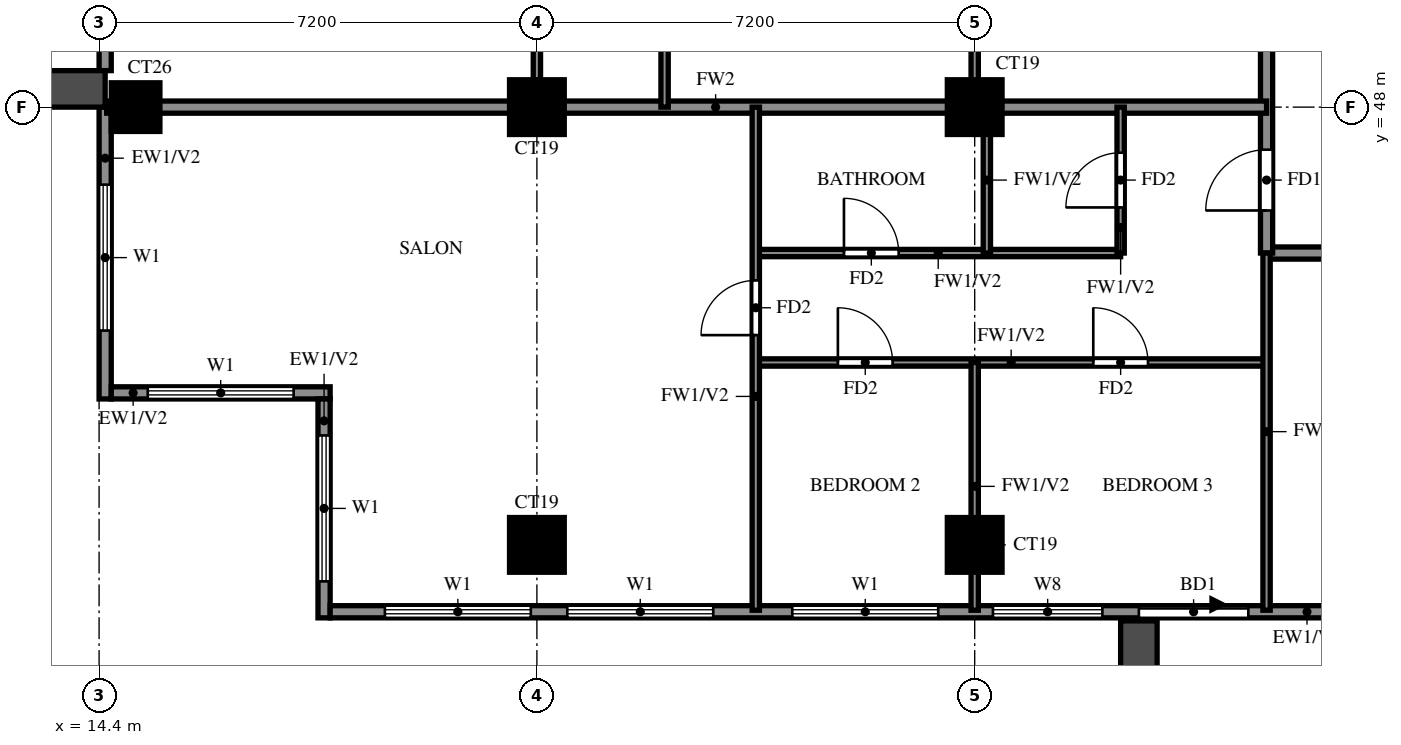
"""IFC4 building model, lengths in metres.
Left out: names, types, materials, properties, quantities, classifications, styles, units other than length and angle.
Written with IfcOpenShell. Run it as: python <this file> out.ifc"""

import sys

from ifc_helpers import new_model, si_unit, direction, frame, frame_2d, origin, origin_2d, place, context, subcontext, project, spatial, rectangle, extrude, source, transform, mapped, element, fill, save


model = new_model("IFC4")
c1 = context("Model", 3, precision=1e-05, world=origin(), true_north=direction((0.0, 1.0)))
c2 = subcontext(c1, "Body", "Model", "MODEL_VIEW")
j1 = project(units=[si_unit("LENGTHUNIT", "METRE"), si_unit("PLANEANGLEUNIT", "RADIAN")], contexts=[c1])
p1 = place(None, origin())
s1 = spatial("IfcSite", under=j1, at=p1, CompositionType="ELEMENT")
p2 = place(p1, origin())
s2 = spatial("IfcBuilding", under=s1, at=p2, CompositionType="ELEMENT")
p3 = place(p2, frame((0.0, 0.0, 174.5)))
s3 = spatial("IfcBuildingStorey", under=s2, at=p3, CompositionType="ELEMENT", Elevation=174.5)
m1 = source(origin(), c2, "Body", "SweptSolid", [
    extrude(rectangle(XDim=0.9, YDim=0.9, at=origin_2d()), origin(), (0.0, 0.0, 1.0), 3.2),
])
for number, where, z_axis, x_axis in (
    (1, (21.6, 40.8, 0.0), (0.0, 0.0, 1.0), (1.0, 0.0, 0.0)),
    (2, (28.8, 40.8, 0.0), (0.0, 0.0, 1.0), (1.0, 0.0, 0.0)),
):
    element("IfcColumn", number, at=place(p3, frame(where, z_axis=z_axis, x_axis=x_axis)), inside=s3, PredefinedType="COLUMN", context=c2, shape_type="MappedRepresentation", body=[
        mapped(m1, transform((0.0, 0.0, 0.0))),
    ])
m2 = source(origin(), c2, "Body", "SweptSolid", [
    extrude(rectangle(XDim=0.8, YDim=0.8, at=origin_2d()), origin(), (0.0, 0.0, 1.0), 3.2),
])
p4 = place(p3, frame((15.0, 48.0, 0.0), z_axis=(0.0, 0.0, 1.0), x_axis=(1.0, 0.0, 0.0)))
e3 = element("IfcColumn", 3, at=p4, inside=s3, PredefinedType="COLUMN", context=c2, shape_type="MappedRepresentation", body=[
    mapped(m2, transform((0.0, 0.0, 0.0))),
])
for number, where, z_axis, x_axis in (
    (4, (21.6, 48.0, 0.0), (0.0, 0.0, 1.0), (1.0, 0.0, 0.0)),
    (5, (28.8, 48.0, 0.0), (0.0, 0.0, 1.0), (1.0, 0.0, 0.0)),
):
    element("IfcColumn", number, at=place(p3, frame(where, z_axis=z_axis, x_axis=x_axis)), inside=s3, PredefinedType="COLUMN", context=c2, shape_type="MappedRepresentation", body=[
        mapped(m1, transform((0.0, 0.0, 0.0))),
    ])
p5 = place(p3, frame((14.5, 54.6, 0.0), z_axis=(0.0, 0.0, 1.0), x_axis=(0.0, -1.0, 0.0)))
e6 = element("IfcWall", 6, at=p5, inside=s3, PredefinedType="SOLIDWALL", context=c2, shape_type="SweptSolid", body=[
    extrude(rectangle(XDim=6.0, YDim=0.2, at=frame_2d((3.0, 0.0))), origin(), (0.0, 0.0, 1.0), 3.2),
])
p6 = place(p5, frame((0.9, 0.0, 0.0)))
e7 = element("IfcOpeningElement", 7, at=p6, cuts=e6, PredefinedType="OPENING", context=c2, shape_type="SweptSolid", body=[
    extrude(rectangle(XDim=1.8, YDim=2.4, at=frame_2d((0.9, 1.2))), frame((0.0, 0.11, 0.0), z_axis=(0.0, -1.0, 0.0), x_axis=(1.0, 0.0, 0.0)), (0.0, 0.0, 1.0), 0.22),
])
p7 = place(p5, frame((3.5, 0.0, 0.6)))
e8 = element("IfcOpeningElement", 8, at=p7, cuts=e6, PredefinedType="OPENING", context=c2, shape_type="SweptSolid", body=[
    extrude(rectangle(XDim=1.8, YDim=2.4, at=frame_2d((0.9, 1.2))), frame((0.0, 0.11, 0.0), z_axis=(0.0, -1.0, 0.0), x_axis=(1.0, 0.0, 0.0)), (0.0, 0.0, 1.0), 0.22),
])
p8 = place(p3, frame((14.5, 48.0, 0.0), z_axis=(0.0, 0.0, 1.0), x_axis=(0.0, -1.0, 0.0)))
e9 = element("IfcWall", 9, at=p8, inside=s3, PredefinedType="SOLIDWALL", context=c2, shape_type="SweptSolid", body=[
    extrude(rectangle(XDim=4.8, YDim=0.2, at=frame_2d((2.4, 0.0))), origin(), (0.0, 0.0, 1.0), 3.2),
])
p9 = place(p8, frame((1.275, 0.0, 0.6)))
e10 = element("IfcOpeningElement", 10, at=p9, cuts=e9, PredefinedType="OPENING", context=c2, shape_type="SweptSolid", body=[
    extrude(rectangle(XDim=2.4, YDim=2.4, at=frame_2d((1.2, 1.2))), frame((0.0, 0.11, 0.0), z_axis=(0.0, -1.0, 0.0), x_axis=(1.0, 0.0, 0.0)), (0.0, 0.0, 1.0), 0.22),
])
p10 = place(p3, frame((14.6, 43.3, 0.0), z_axis=(0.0, 0.0, 1.0), x_axis=(1.0, 0.0, 0.0)))
e11 = element("IfcWall", 11, at=p10, inside=s3, PredefinedType="SOLIDWALL", context=c2, shape_type="SweptSolid", body=[
    extrude(rectangle(XDim=3.6, YDim=0.2, at=frame_2d((1.8, 0.0))), origin(), (0.0, 0.0, 1.0), 3.2),
])
p11 = place(p10, frame((0.6, 0.0, 0.6)))
e12 = element("IfcOpeningElement", 12, at=p11, cuts=e11, PredefinedType="OPENING", context=c2, shape_type="SweptSolid", body=[
    extrude(rectangle(XDim=2.4, YDim=2.4, at=frame_2d((1.2, 1.2))), frame((0.0, 0.11, 0.0), z_axis=(0.0, -1.0, 0.0), x_axis=(1.0, 0.0, 0.0)), (0.0, 0.0, 1.0), 0.22),
])
p12 = place(p3, frame((18.1, 43.2, 0.0), z_axis=(0.0, 0.0, 1.0), x_axis=(0.0, -1.0, 0.0)))
e13 = element("IfcWall", 13, at=p12, inside=s3, PredefinedType="SOLIDWALL", context=c2, shape_type="SweptSolid", body=[
    extrude(rectangle(XDim=3.6, YDim=0.2, at=frame_2d((1.8, 0.0))), origin(), (0.0, 0.0, 1.0), 3.2),
])
p13 = place(p12, frame((0.6, 0.0, 0.6)))
e14 = element("IfcOpeningElement", 14, at=p13, cuts=e13, PredefinedType="OPENING", context=c2, shape_type="SweptSolid", body=[
    extrude(rectangle(XDim=2.4, YDim=2.4, at=frame_2d((1.2, 1.2))), frame((0.0, 0.11, 0.0), z_axis=(0.0, -1.0, 0.0), x_axis=(1.0, 0.0, 0.0)), (0.0, 0.0, 1.0), 0.22),
])
p14 = place(p3, frame((18.2, 39.7, 0.0), z_axis=(0.0, 0.0, 1.0), x_axis=(1.0, 0.0, 0.0)))
e15 = element("IfcWall", 15, at=p14, inside=s3, PredefinedType="SOLIDWALL", context=c2, shape_type="SweptSolid", body=[
    extrude(rectangle(XDim=23.8, YDim=0.2, at=frame_2d((11.9, 0.0))), origin(), (0.0, 0.0, 1.0), 3.2),
])
p15 = place(p14, frame((13.3, 0.0, 0.0)))
e16 = element("IfcOpeningElement", 16, at=p15, cuts=e15, PredefinedType="OPENING", context=c2, shape_type="SweptSolid", body=[
    extrude(rectangle(XDim=1.8, YDim=2.4, at=frame_2d((0.9, 1.2))), frame((0.0, 0.11, 0.0), z_axis=(0.0, -1.0, 0.0), x_axis=(1.0, 0.0, 0.0)), (0.0, 0.0, 1.0), 0.22),
])
p16 = place(p14, frame((0.9, 0.0, 0.6)))
e17 = element("IfcOpeningElement", 17, at=p16, cuts=e15, PredefinedType="OPENING", context=c2, shape_type="SweptSolid", body=[
    extrude(rectangle(XDim=2.4, YDim=2.4, at=frame_2d((1.2, 1.2))), frame((0.0, 0.11, 0.0), z_axis=(0.0, -1.0, 0.0), x_axis=(1.0, 0.0, 0.0)), (0.0, 0.0, 1.0), 0.22),
])
p17 = place(p14, frame((3.9, 0.0, 0.6)))
e18 = element("IfcOpeningElement", 18, at=p17, cuts=e15, PredefinedType="OPENING", context=c2, shape_type="SweptSolid", body=[
    extrude(rectangle(XDim=2.4, YDim=2.4, at=frame_2d((1.2, 1.2))), frame((0.0, 0.11, 0.0), z_axis=(0.0, -1.0, 0.0), x_axis=(1.0, 0.0, 0.0)), (0.0, 0.0, 1.0), 0.22),
])
p18 = place(p14, frame((7.6, 0.0, 0.6)))
e19 = element("IfcOpeningElement", 19, at=p18, cuts=e15, PredefinedType="OPENING", context=c2, shape_type="SweptSolid", body=[
    extrude(rectangle(XDim=2.4, YDim=2.4, at=frame_2d((1.2, 1.2))), frame((0.0, 0.11, 0.0), z_axis=(0.0, -1.0, 0.0), x_axis=(1.0, 0.0, 0.0)), (0.0, 0.0, 1.0), 0.22),
])
p19 = place(p14, frame((10.9, 0.0, 0.6)))
e20 = element("IfcOpeningElement", 20, at=p19, cuts=e15, PredefinedType="OPENING", context=c2, shape_type="SweptSolid", body=[
    extrude(rectangle(XDim=1.8, YDim=2.4, at=frame_2d((0.9, 1.2))), frame((0.0, 0.11, 0.0), z_axis=(0.0, -1.0, 0.0), x_axis=(1.0, 0.0, 0.0)), (0.0, 0.0, 1.0), 0.22),
])
p20 = place(p3, frame((14.5, 48.3, 0.0), z_axis=(0.0, 0.0, 1.0), x_axis=(-1.0, 0.0, 0.0)))
e21 = element("IfcWall", 21, at=p20, inside=s3, PredefinedType="SOLIDWALL", context=c2, shape_type="SweptSolid", body=[
    extrude(rectangle(XDim=2.8, YDim=0.6, at=frame_2d((1.4, 0.0))), origin(), (0.0, 0.0, 1.0), 2.85),
])
p21 = place(p3, frame((31.5, 39.55, 0.0), z_axis=(0.0, 0.0, 1.0), x_axis=(0.0, -1.0, 0.0)))
e22 = element("IfcWall", 22, at=p21, inside=s3, PredefinedType="SOLIDWALL", context=c2, shape_type="SweptSolid", body=[
    extrude(rectangle(XDim=2.65, YDim=0.6, at=frame_2d((1.325, 0.0))), origin(), (0.0, 0.0, 1.0), 2.85),
])
p22 = place(p3, frame((33.6, 45.6, 0.0), z_axis=(0.0, 0.0, 1.0), x_axis=(1.0, 0.0, 0.0)))
e23 = element("IfcWall", 23, at=p22, inside=s3, PredefinedType="SOLIDWALL", context=c2, shape_type="SweptSolid", body=[
    extrude(rectangle(XDim=7.2, YDim=0.2, at=frame_2d((3.6, 0.0))), origin(), (0.0, 0.0, 1.0), 3.2),
])
p23 = place(p22, frame((3.15, 0.0, 0.0)))
e24 = element("IfcOpeningElement", 24, at=p23, cuts=e23, PredefinedType="OPENING", context=c2, shape_type="SweptSolid", body=[
    extrude(rectangle(XDim=0.9, YDim=2.1, at=frame_2d((0.45, 1.05))), frame((0.0, 0.11, 0.0), z_axis=(0.0, -1.0, 0.0), x_axis=(1.0, 0.0, 0.0)), (0.0, 0.0, 1.0), 0.22),
])
p24 = place(p3, frame((33.6, 45.6, 0.0), z_axis=(0.0, 0.0, 1.0), x_axis=(0.0, 1.0, 0.0)))
e25 = element("IfcWall", 25, at=p24, inside=s3, PredefinedType="SOLIDWALL", context=c2, shape_type="SweptSolid", body=[
    extrude(rectangle(XDim=8.4, YDim=0.2, at=frame_2d((4.2, 0.0))), origin(), (0.0, 0.0, 1.0), 3.2),
])
p25 = place(p24, frame((0.7, 0.0, 0.0)))
e26 = element("IfcOpeningElement", 26, at=p25, cuts=e25, PredefinedType="OPENING", context=c2, shape_type="SweptSolid", body=[
    extrude(rectangle(XDim=1.0, YDim=2.1, at=frame_2d((0.5, 1.05))), frame((0.0, 0.11, 0.0), z_axis=(0.0, -1.0, 0.0), x_axis=(1.0, 0.0, 0.0)), (0.0, 0.0, 1.0), 0.22),
])
p26 = place(p24, frame((6.7, 0.0, 0.0)))
e27 = element("IfcOpeningElement", 27, at=p26, cuts=e25, PredefinedType="OPENING", context=c2, shape_type="SweptSolid", body=[
    extrude(rectangle(XDim=1.0, YDim=2.1, at=frame_2d((0.5, 1.05))), frame((0.0, 0.11, 0.0), z_axis=(0.0, -1.0, 0.0), x_axis=(1.0, 0.0, 0.0)), (0.0, 0.0, 1.0), 0.22),
])
p27 = place(p3, frame((14.525, 48.0, 0.0), z_axis=(0.0, 0.0, 1.0), x_axis=(1.0, 0.0, 0.0)))
e28 = element("IfcWall", 28, at=p27, inside=s3, PredefinedType="SOLIDWALL", context=c2, shape_type="SweptSolid", body=[
    extrude(rectangle(XDim=19.075, YDim=0.2, at=frame_2d((9.538, 0.0))), origin(), (0.0, 0.0, 1.0), 3.2),
])
p28 = place(p3, frame((25.2, 43.8, 0.0), z_axis=(0.0, 0.0, 1.0), x_axis=(1.0, 0.0, 0.0)))
e29 = element("IfcWall", 29, at=p28, inside=s3, PredefinedType="PARTITIONING", context=c2, shape_type="SweptSolid", body=[
    extrude(rectangle(XDim=8.4, YDim=0.12, at=frame_2d((4.2, 0.0))), origin(), (0.0, 0.0, 1.0), 3.2),
])
p29 = place(p28, frame((1.35, 0.0, 0.0)))
e30 = element("IfcOpeningElement", 30, at=p29, cuts=e29, PredefinedType="OPENING", context=c2, shape_type="SweptSolid", body=[
    extrude(rectangle(XDim=0.9, YDim=2.1, at=frame_2d((0.45, 1.05))), frame((0.0, 0.07, 0.0), z_axis=(0.0, -1.0, 0.0), x_axis=(1.0, 0.0, 0.0)), (0.0, 0.0, 1.0), 0.14),
])
p30 = place(p28, frame((5.55, 0.0, 0.0)))
e31 = element("IfcOpeningElement", 31, at=p30, cuts=e29, PredefinedType="OPENING", context=c2, shape_type="SweptSolid", body=[
    extrude(rectangle(XDim=0.9, YDim=2.1, at=frame_2d((0.45, 1.05))), frame((0.0, 0.07, 0.0), z_axis=(0.0, -1.0, 0.0), x_axis=(1.0, 0.0, 0.0)), (0.0, 0.0, 1.0), 0.14),
])
p31 = place(p3, frame((25.2, 45.6, 0.0), z_axis=(0.0, 0.0, 1.0), x_axis=(1.0, 0.0, 0.0)))
e32 = element("IfcWall", 32, at=p31, inside=s3, PredefinedType="PARTITIONING", context=c2, shape_type="SweptSolid", body=[
    extrude(rectangle(XDim=6.0, YDim=0.12, at=frame_2d((3.0, 0.0))), origin(), (0.0, 0.0, 1.0), 3.2),
])
p32 = place(p31, frame((1.45, 0.0, 0.0)))
e33 = element("IfcOpeningElement", 33, at=p32, cuts=e32, PredefinedType="OPENING", context=c2, shape_type="SweptSolid", body=[
    extrude(rectangle(XDim=0.9, YDim=2.1, at=frame_2d((0.45, 1.05))), frame((0.0, 0.07, 0.0), z_axis=(0.0, -1.0, 0.0), x_axis=(1.0, 0.0, 0.0)), (0.0, 0.0, 1.0), 0.14),
])
p33 = place(p3, frame((21.6, 48.0, 0.0), z_axis=(0.0, 0.0, 1.0), x_axis=(0.0, 1.0, 0.0)))
e34 = element("IfcWall", 34, at=p33, inside=s3, PredefinedType="PARTITIONING", context=c2, shape_type="SweptSolid", body=[
    extrude(rectangle(XDim=21.6, YDim=0.12, at=frame_2d((10.8, 0.0))), origin(), (0.0, 0.0, 1.0), 3.2),
])
p34 = place(p33, frame((1.35, 0.0, 0.0)))
e35 = element("IfcOpeningElement", 35, at=p34, cuts=e34, PredefinedType="OPENING", context=c2, shape_type="SweptSolid", body=[
    extrude(rectangle(XDim=0.9, YDim=2.1, at=frame_2d((0.45, 1.05))), frame((0.0, 0.07, 0.0), z_axis=(0.0, -1.0, 0.0), x_axis=(1.0, 0.0, 0.0)), (0.0, 0.0, 1.0), 0.14),
])
p35 = place(p33, frame((7.95, 0.0, 0.0)))
e36 = element("IfcOpeningElement", 36, at=p35, cuts=e34, PredefinedType="OPENING", context=c2, shape_type="SweptSolid", body=[
    extrude(rectangle(XDim=1.5, YDim=2.1, at=frame_2d((0.75, 1.05))), frame((0.0, 0.07, 0.0), z_axis=(0.0, -1.0, 0.0), x_axis=(1.0, 0.0, 0.0)), (0.0, 0.0, 1.0), 0.14),
])
p36 = place(p33, frame((12.15, 0.0, 0.0)))
e37 = element("IfcOpeningElement", 37, at=p36, cuts=e34, PredefinedType="OPENING", context=c2, shape_type="SweptSolid", body=[
    extrude(rectangle(XDim=0.9, YDim=2.1, at=frame_2d((0.45, 1.05))), frame((0.0, 0.07, 0.0), z_axis=(0.0, -1.0, 0.0), x_axis=(1.0, 0.0, 0.0)), (0.0, 0.0, 1.0), 0.14),
])
p37 = place(p33, frame((17.55, 0.0, 0.0)))
e38 = element("IfcOpeningElement", 38, at=p37, cuts=e34, PredefinedType="OPENING", context=c2, shape_type="SweptSolid", body=[
    extrude(rectangle(XDim=0.9, YDim=2.1, at=frame_2d((0.45, 1.05))), frame((0.0, 0.07, 0.0), z_axis=(0.0, -1.0, 0.0), x_axis=(1.0, 0.0, 0.0)), (0.0, 0.0, 1.0), 0.14),
])
p38 = place(p3, frame((23.7, 48.0, 0.0), z_axis=(0.0, 0.0, 1.0), x_axis=(0.0, 1.0, 0.0)))
e39 = element("IfcWall", 39, at=p38, inside=s3, PredefinedType="PARTITIONING", context=c2, shape_type="SweptSolid", body=[
    extrude(rectangle(XDim=3.6, YDim=0.12, at=frame_2d((1.8, 0.0))), origin(), (0.0, 0.0, 1.0), 3.2),
])
p39 = place(p3, frame((25.2, 39.725, 0.0), z_axis=(0.0, 0.0, 1.0), x_axis=(0.0, 1.0, 0.0)))
e40 = element("IfcWall", 40, at=p39, inside=s3, PredefinedType="PARTITIONING", context=c2, shape_type="SweptSolid", body=[
    extrude(rectangle(XDim=8.275, YDim=0.12, at=frame_2d((4.137, 0.0))), origin(), (0.0, 0.0, 1.0), 3.2),
])
p40 = place(p39, frame((4.525, 0.0, 0.0)))
e41 = element("IfcOpeningElement", 41, at=p40, cuts=e40, PredefinedType="OPENING", context=c2, shape_type="SweptSolid", body=[
    extrude(rectangle(XDim=0.9, YDim=2.1, at=frame_2d((0.45, 1.05))), frame((0.0, 0.07, 0.0), z_axis=(0.0, -1.0, 0.0), x_axis=(1.0, 0.0, 0.0)), (0.0, 0.0, 1.0), 0.14),
])
p41 = place(p3, frame((28.8, 39.725, 0.0), z_axis=(0.0, 0.0, 1.0), x_axis=(0.0, 1.0, 0.0)))
e42 = element("IfcWall", 42, at=p41, inside=s3, PredefinedType="PARTITIONING", context=c2, shape_type="SweptSolid", body=[
    extrude(rectangle(XDim=4.075, YDim=0.12, at=frame_2d((2.038, 0.0))), origin(), (0.0, 0.0, 1.0), 3.2),
])
p42 = place(p3, frame((28.8, 48.0, 0.0), z_axis=(0.0, 0.0, 1.0), x_axis=(0.0, 1.0, 0.0)))
e43 = element("IfcWall", 43, at=p42, inside=s3, PredefinedType="PARTITIONING", context=c2, shape_type="SweptSolid", body=[
    extrude(rectangle(XDim=3.6, YDim=0.12, at=frame_2d((1.8, 0.0))), origin(), (0.0, 0.0, 1.0), 3.2),
])
p43 = place(p3, frame((29.0, 45.6, 0.0), z_axis=(0.0, 0.0, 1.0), x_axis=(0.0, 1.0, 0.0)))
e44 = element("IfcWall", 44, at=p43, inside=s3, PredefinedType="PARTITIONING", context=c2, shape_type="SweptSolid", body=[
    extrude(rectangle(XDim=2.4, YDim=0.12, at=frame_2d((1.2, 0.0))), origin(), (0.0, 0.0, 1.0), 3.2),
])
p44 = place(p3, frame((31.2, 45.6, 0.0), z_axis=(0.0, 0.0, 1.0), x_axis=(0.0, 1.0, 0.0)))
e45 = element("IfcWall", 45, at=p44, inside=s3, PredefinedType="PARTITIONING", context=c2, shape_type="SweptSolid", body=[
    extrude(rectangle(XDim=2.4, YDim=0.12, at=frame_2d((1.2, 0.0))), origin(), (0.0, 0.0, 1.0), 3.2),
])
p45 = place(p44, frame((0.75, 0.0, 0.0)))
e46 = element("IfcOpeningElement", 46, at=p45, cuts=e45, PredefinedType="OPENING", context=c2, shape_type="SweptSolid", body=[
    extrude(rectangle(XDim=0.9, YDim=2.1, at=frame_2d((0.45, 1.05))), frame((0.0, 0.07, 0.0), z_axis=(0.0, -1.0, 0.0), x_axis=(1.0, 0.0, 0.0)), (0.0, 0.0, 1.0), 0.14),
])
p46 = place(p3, frame((33.6, 39.725, 0.0), z_axis=(0.0, 0.0, 1.0), x_axis=(0.0, 1.0, 0.0)))
e47 = element("IfcWall", 47, at=p46, inside=s3, PredefinedType="PARTITIONING", context=c2, shape_type="SweptSolid", body=[
    extrude(rectangle(XDim=5.875, YDim=0.12, at=frame_2d((2.938, 0.0))), origin(), (0.0, 0.0, 1.0), 3.2),
])
p47 = place(p9, origin())
e48 = element("IfcWindow", 48, at=p47, inside=s3, PartitioningType="DOUBLE_PANEL_VERTICAL", PredefinedType="WINDOW", context=c2, shape_type="SweptSolid", body=[
    extrude(rectangle(XDim=2.4, YDim=2.4, at=frame_2d((1.2, 1.2))), frame((0.0, 0.03, 0.0), z_axis=(0.0, -1.0, 0.0), x_axis=(1.0, 0.0, 0.0)), (0.0, 0.0, 1.0), 0.06),
])
fill(e10, e48)
p48 = place(p11, origin())
e49 = element("IfcWindow", 49, at=p48, inside=s3, PartitioningType="DOUBLE_PANEL_VERTICAL", PredefinedType="WINDOW", context=c2, shape_type="SweptSolid", body=[
    extrude(rectangle(XDim=2.4, YDim=2.4, at=frame_2d((1.2, 1.2))), frame((0.0, 0.03, 0.0), z_axis=(0.0, -1.0, 0.0), x_axis=(1.0, 0.0, 0.0)), (0.0, 0.0, 1.0), 0.06),
])
fill(e12, e49)
p49 = place(p13, origin())
e50 = element("IfcWindow", 50, at=p49, inside=s3, PartitioningType="DOUBLE_PANEL_VERTICAL", PredefinedType="WINDOW", context=c2, shape_type="SweptSolid", body=[
    extrude(rectangle(XDim=2.4, YDim=2.4, at=frame_2d((1.2, 1.2))), frame((0.0, 0.03, 0.0), z_axis=(0.0, -1.0, 0.0), x_axis=(1.0, 0.0, 0.0)), (0.0, 0.0, 1.0), 0.06),
])
fill(e14, e50)
p50 = place(p15, origin())
e51 = element("IfcDoor", 51, at=p50, inside=s3, OperationType="DOUBLE_DOOR_SLIDING", PredefinedType="DOOR", context=c2, shape_type="SweptSolid", body=[
    extrude(rectangle(XDim=1.8, YDim=2.4, at=frame_2d((0.9, 1.2))), frame((0.0, 0.025, 0.0), z_axis=(0.0, -1.0, 0.0), x_axis=(1.0, 0.0, 0.0)), (0.0, 0.0, 1.0), 0.05),
])
fill(e16, e51)
p51 = place(p16, origin())
e52 = element("IfcWindow", 52, at=p51, inside=s3, PartitioningType="DOUBLE_PANEL_VERTICAL", PredefinedType="WINDOW", context=c2, shape_type="SweptSolid", body=[
    extrude(rectangle(XDim=2.4, YDim=2.4, at=frame_2d((1.2, 1.2))), frame((0.0, 0.03, 0.0), z_axis=(0.0, -1.0, 0.0), x_axis=(1.0, 0.0, 0.0)), (0.0, 0.0, 1.0), 0.06),
])
fill(e17, e52)
p52 = place(p17, origin())
e53 = element("IfcWindow", 53, at=p52, inside=s3, PartitioningType="DOUBLE_PANEL_VERTICAL", PredefinedType="WINDOW", context=c2, shape_type="SweptSolid", body=[
    extrude(rectangle(XDim=2.4, YDim=2.4, at=frame_2d((1.2, 1.2))), frame((0.0, 0.03, 0.0), z_axis=(0.0, -1.0, 0.0), x_axis=(1.0, 0.0, 0.0)), (0.0, 0.0, 1.0), 0.06),
])
fill(e18, e53)
p53 = place(p18, origin())
e54 = element("IfcWindow", 54, at=p53, inside=s3, PartitioningType="DOUBLE_PANEL_VERTICAL", PredefinedType="WINDOW", context=c2, shape_type="SweptSolid", body=[
    extrude(rectangle(XDim=2.4, YDim=2.4, at=frame_2d((1.2, 1.2))), frame((0.0, 0.03, 0.0), z_axis=(0.0, -1.0, 0.0), x_axis=(1.0, 0.0, 0.0)), (0.0, 0.0, 1.0), 0.06),
])
fill(e19, e54)
p54 = place(p19, origin())
e55 = element("IfcWindow", 55, at=p54, inside=s3, PartitioningType="DOUBLE_PANEL_VERTICAL", PredefinedType="WINDOW", context=c2, shape_type="SweptSolid", body=[
    extrude(rectangle(XDim=1.8, YDim=2.4, at=frame_2d((0.9, 1.2))), frame((0.0, 0.03, 0.0), z_axis=(0.0, -1.0, 0.0), x_axis=(1.0, 0.0, 0.0)), (0.0, 0.0, 1.0), 0.06),
])
fill(e20, e55)
p55 = place(p25, origin())
e56 = element("IfcDoor", 56, at=p55, inside=s3, OperationType="SINGLE_SWING_LEFT", PredefinedType="DOOR", context=c2, shape_type="SweptSolid", body=[
    extrude(rectangle(XDim=1.0, YDim=2.1, at=frame_2d((0.5, 1.05))), frame((0.0, 0.025, 0.0), z_axis=(0.0, -1.0, 0.0), x_axis=(1.0, 0.0, 0.0)), (0.0, 0.0, 1.0), 0.05),
])
fill(e26, e56)
p56 = place(p40, origin())
e57 = element("IfcDoor", 57, at=p56, inside=s3, OperationType="SINGLE_SWING_LEFT", PredefinedType="DOOR", context=c2, shape_type="SweptSolid", body=[
    extrude(rectangle(XDim=0.9, YDim=2.1, at=frame_2d((0.45, 1.05))), frame((0.0, 0.025, 0.0), z_axis=(0.0, -1.0, 0.0), x_axis=(1.0, 0.0, 0.0)), (0.0, 0.0, 1.0), 0.05),
])
fill(e41, e57)
p57 = place(p29, origin())
e58 = element("IfcDoor", 58, at=p57, inside=s3, OperationType="SINGLE_SWING_RIGHT", PredefinedType="DOOR", context=c2, shape_type="SweptSolid", body=[
    extrude(rectangle(XDim=0.9, YDim=2.1, at=frame_2d((0.45, 1.05))), frame((0.0, 0.025, 0.0), z_axis=(0.0, -1.0, 0.0), x_axis=(1.0, 0.0, 0.0)), (0.0, 0.0, 1.0), 0.05),
])
fill(e30, e58)
p58 = place(p30, origin())
e59 = element("IfcDoor", 59, at=p58, inside=s3, OperationType="SINGLE_SWING_LEFT", PredefinedType="DOOR", context=c2, shape_type="SweptSolid", body=[
    extrude(rectangle(XDim=0.9, YDim=2.1, at=frame_2d((0.45, 1.05))), frame((0.0, 0.025, 0.0), z_axis=(0.0, -1.0, 0.0), x_axis=(1.0, 0.0, 0.0)), (0.0, 0.0, 1.0), 0.05),
])
fill(e31, e59)
p59 = place(p32, origin())
e60 = element("IfcDoor", 60, at=p59, inside=s3, OperationType="SINGLE_SWING_LEFT", PredefinedType="DOOR", context=c2, shape_type="SweptSolid", body=[
    extrude(rectangle(XDim=0.9, YDim=2.1, at=frame_2d((0.45, 1.05))), frame((0.0, 0.025, 0.0), z_axis=(0.0, -1.0, 0.0), x_axis=(1.0, 0.0, 0.0)), (0.0, 0.0, 1.0), 0.05),
])
fill(e33, e60)
p60 = place(p45, origin())
e61 = element("IfcDoor", 61, at=p60, inside=s3, OperationType="SINGLE_SWING_RIGHT", PredefinedType="DOOR", context=c2, shape_type="SweptSolid", body=[
    extrude(rectangle(XDim=0.9, YDim=2.1, at=frame_2d((0.45, 1.05))), frame((0.0, 0.025, 0.0), z_axis=(0.0, -1.0, 0.0), x_axis=(1.0, 0.0, 0.0)), (0.0, 0.0, 1.0), 0.05),
])
fill(e46, e61)
save(model, sys.argv[1])
